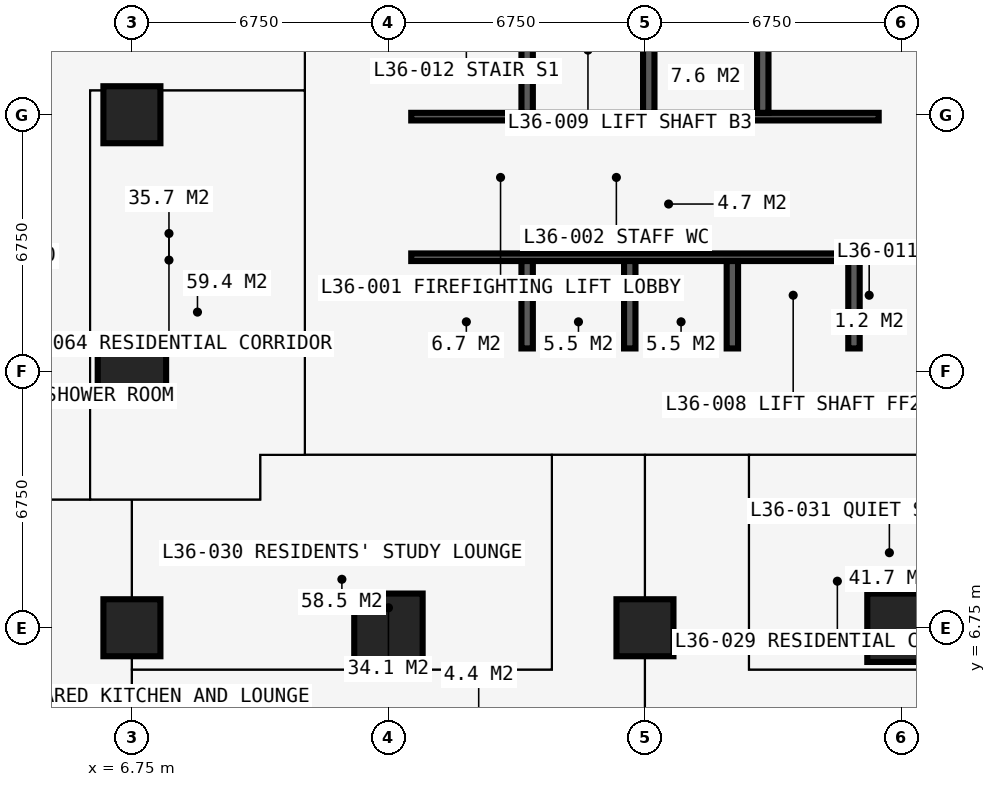
"""IFC4 building model, lengths in metres.
Left out: names, types, materials, properties, quantities, classifications, styles, units other than length and angle.
Written with IfcOpenShell. Run it as: python <this file> out.ifc"""

import sys

from ifc_helpers import new_model, si_unit, direction, frame, frame_2d, origin, origin_2d, place, context, subcontext, project, spatial, rectangle, extrude, element, fill, save


model = new_model("IFC4")
c1 = context("Model", 3, precision=1e-05, world=origin(), true_north=direction((0.0, 1.0)))
c2 = subcontext(c1, "Body", "Model", "MODEL_VIEW")
j1 = project(units=[si_unit("LENGTHUNIT", "METRE"), si_unit("PLANEANGLEUNIT", "RADIAN")], contexts=[c1])
p1 = place(None, origin())
s1 = spatial("IfcSite", under=j1, at=p1, CompositionType="ELEMENT")
p2 = place(p1, origin())
s2 = spatial("IfcBuilding", under=s1, at=p2, CompositionType="ELEMENT")
p3 = place(p2, frame((0.0, 0.0, 134.1)))
s3 = spatial("IfcBuildingStorey", under=s2, at=p3, CompositionType="ELEMENT", Elevation=134.1)
p4 = place(p3, frame((6.75, 6.75, 0.0), z_axis=(0.0, 0.0, 1.0), x_axis=(1.0, 0.0, 0.0)))
e1 = element("IfcColumn", 1, at=p4, inside=s3, PredefinedType="COLUMN", context=c2, shape_type="SweptSolid", body=[
    extrude(rectangle(XDim=1.5, YDim=1.5, at=origin_2d()), origin(), (0.0, 0.0, 1.0), 3.6),
])
p5 = place(p3, frame((6.75, 13.5, 0.0), z_axis=(0.0, 0.0, 1.0), x_axis=(1.0, 0.0, 0.0)))
e2 = element("IfcColumn", 2, at=p5, inside=s3, PredefinedType="COLUMN", context=c2, shape_type="SweptSolid", body=[
    extrude(rectangle(XDim=1.8, YDim=1.8, at=origin_2d()), origin(), (0.0, 0.0, 1.0), 3.6),
])
p6 = place(p3, frame((6.75, 20.25, 0.0), z_axis=(0.0, 0.0, 1.0), x_axis=(1.0, 0.0, 0.0)))
e3 = element("IfcColumn", 3, at=p6, inside=s3, PredefinedType="COLUMN", context=c2, shape_type="SweptSolid", body=[
    extrude(rectangle(XDim=1.5, YDim=1.5, at=origin_2d()), origin(), (0.0, 0.0, 1.0), 3.6),
])
p7 = place(p3, frame((13.5, 6.75, 0.0), z_axis=(0.0, 0.0, 1.0), x_axis=(1.0, 0.0, 0.0)))
e4 = element("IfcColumn", 4, at=p7, inside=s3, PredefinedType="COLUMN", context=c2, shape_type="SweptSolid", body=[
    extrude(rectangle(XDim=1.8, YDim=1.8, at=origin_2d()), origin(), (0.0, 0.0, 1.0), 3.6),
])
p8 = place(p3, frame((20.25, 6.75, 0.0), z_axis=(0.0, 0.0, 1.0), x_axis=(1.0, 0.0, 0.0)))
e5 = element("IfcColumn", 5, at=p8, inside=s3, PredefinedType="COLUMN", context=c2, shape_type="SweptSolid", body=[
    extrude(rectangle(XDim=1.5, YDim=1.5, at=origin_2d()), origin(), (0.0, 0.0, 1.0), 3.6),
])
p9 = place(p3, frame((27.0, 6.75, 0.0), z_axis=(0.0, 0.0, 1.0), x_axis=(1.0, 0.0, 0.0)))
e6 = element("IfcColumn", 6, at=p9, inside=s3, PredefinedType="COLUMN", context=c2, shape_type="SweptSolid", body=[
    extrude(rectangle(XDim=1.8, YDim=1.8, at=origin_2d()), origin(), (0.0, 0.0, 1.0), 3.6),
])
p10 = place(p3, frame((12.9, 13.5, 0.0), z_axis=(0.0, 0.0, 1.0), x_axis=(1.0, 0.0, 0.0)))
e7 = element("IfcWall", 7, at=p10, inside=s3, PredefinedType="SHEAR", context=c2, shape_type="SweptSolid", body=[
    extrude(rectangle(XDim=14.7, YDim=1.2, at=frame_2d((7.35, 0.0))), origin(), (0.0, 0.0, 1.0), 3.6),
])
p11 = place(p3, frame((27.0, 14.1, 0.0), z_axis=(0.0, 0.0, 1.0), x_axis=(0.0, 1.0, 0.0)))
e8 = element("IfcWall", 8, at=p11, inside=s3, PredefinedType="SHEAR", context=c2, shape_type="SweptSolid", body=[
    extrude(rectangle(XDim=12.3, YDim=1.2, at=frame_2d((6.15, 0.0))), origin(), (0.0, 0.0, 1.0), 3.6),
])
p12 = place(p11, frame((3.65, 0.0, 0.0)))
e9 = element("IfcOpeningElement", 9, at=p12, cuts=e8, PredefinedType="OPENING", context=c2, shape_type="SweptSolid", body=[
    extrude(rectangle(XDim=1.2, YDim=2.2, at=frame_2d((0.6, 1.1))), frame((0.0, 0.61, 0.0), z_axis=(0.0, -1.0, 0.0), x_axis=(1.0, 0.0, 0.0)), (0.0, 0.0, 1.0), 1.22),
])
p13 = place(p3, frame((13.5, 26.4, 0.0), z_axis=(0.0, 0.0, 1.0), x_axis=(0.0, -1.0, 0.0)))
e10 = element("IfcWall", 10, at=p13, inside=s3, PredefinedType="SHEAR", context=c2, shape_type="SweptSolid", body=[
    extrude(rectangle(XDim=12.3, YDim=1.2, at=frame_2d((6.15, 0.0))), origin(), (0.0, 0.0, 1.0), 3.6),
])
p14 = place(p13, frame((7.45, 0.0, 0.0)))
e11 = element("IfcOpeningElement", 11, at=p14, cuts=e10, PredefinedType="OPENING", context=c2, shape_type="SweptSolid", body=[
    extrude(rectangle(XDim=1.2, YDim=2.2, at=frame_2d((0.6, 1.1))), frame((0.0, 0.61, 0.0), z_axis=(0.0, -1.0, 0.0), x_axis=(1.0, 0.0, 0.0)), (0.0, 0.0, 1.0), 1.22),
])
p15 = place(p3, frame((14.1, 16.5, 0.0), z_axis=(0.0, 0.0, 1.0), x_axis=(1.0, 0.0, 0.0)))
e12 = element("IfcWall", 12, at=p15, inside=s3, PredefinedType="SHEAR", context=c2, shape_type="SweptSolid", body=[
    extrude(rectangle(XDim=12.3, YDim=0.2, at=frame_2d((6.15, 0.0))), origin(), (0.0, 0.0, 1.0), 3.6),
])
p16 = place(p15, frame((0.9, 0.0, 0.0)))
e13 = element("IfcOpeningElement", 13, at=p16, cuts=e12, PredefinedType="OPENING", context=c2, shape_type="SweptSolid", body=[
    extrude(rectangle(XDim=1.1, YDim=2.2, at=frame_2d((0.55, 1.1))), frame((0.0, 0.11, 0.0), z_axis=(0.0, -1.0, 0.0), x_axis=(1.0, 0.0, 0.0)), (0.0, 0.0, 1.0), 0.22),
])
p17 = place(p15, frame((9.5, 0.0, 0.0)))
e14 = element("IfcOpeningElement", 14, at=p17, cuts=e12, PredefinedType="OPENING", context=c2, shape_type="SweptSolid", body=[
    extrude(rectangle(XDim=1.1, YDim=2.2, at=frame_2d((0.55, 1.1))), frame((0.0, 0.11, 0.0), z_axis=(0.0, -1.0, 0.0), x_axis=(1.0, 0.0, 0.0)), (0.0, 0.0, 1.0), 0.22),
])
p18 = place(p3, frame((14.1, 20.2, 0.0), z_axis=(0.0, 0.0, 1.0), x_axis=(1.0, 0.0, 0.0)))
e15 = element("IfcWall", 15, at=p18, inside=s3, PredefinedType="SHEAR", context=c2, shape_type="SweptSolid", body=[
    extrude(rectangle(XDim=12.3, YDim=0.2, at=frame_2d((6.15, 0.0))), origin(), (0.0, 0.0, 1.0), 3.6),
])
p19 = place(p18, frame((0.35, 0.0, 0.0)))
e16 = element("IfcOpeningElement", 16, at=p19, cuts=e15, PredefinedType="OPENING", context=c2, shape_type="SweptSolid", body=[
    extrude(rectangle(XDim=1.1, YDim=2.2, at=frame_2d((0.55, 1.1))), frame((0.0, 0.11, 0.0), z_axis=(0.0, -1.0, 0.0), x_axis=(1.0, 0.0, 0.0)), (0.0, 0.0, 1.0), 0.22),
])
p20 = place(p18, frame((9.75, 0.0, 0.0)))
e17 = element("IfcOpeningElement", 17, at=p20, cuts=e15, PredefinedType="OPENING", context=c2, shape_type="SweptSolid", body=[
    extrude(rectangle(XDim=1.1, YDim=2.2, at=frame_2d((0.55, 1.1))), frame((0.0, 0.11, 0.0), z_axis=(0.0, -1.0, 0.0), x_axis=(1.0, 0.0, 0.0)), (0.0, 0.0, 1.0), 0.22),
])
for number, where, z_axis, x_axis in (
    (18, (17.15, 20.3, 0.0), (0.0, 0.0, 1.0), (0.0, 1.0, 0.0)),
    (19, (23.35, 20.3, 0.0), (0.0, 0.0, 1.0), (0.0, 1.0, 0.0)),
):
    element("IfcWall", number, at=place(p3, frame(where, z_axis=z_axis, x_axis=x_axis)), inside=s3, PredefinedType="SHEAR", context=c2, shape_type="SweptSolid", body=[
        extrude(rectangle(XDim=6.1, YDim=0.3, at=frame_2d((3.05, 0.0))), origin(), (0.0, 0.0, 1.0), 3.6),
    ])
p21 = place(p3, frame((20.35, 20.3, 0.0), z_axis=(0.0, 0.0, 1.0), x_axis=(0.0, 1.0, 0.0)))
e20 = element("IfcWall", 20, at=p21, inside=s3, PredefinedType="SHEAR", context=c2, shape_type="SweptSolid", body=[
    extrude(rectangle(XDim=2.8, YDim=0.3, at=frame_2d((1.4, 0.0))), origin(), (0.0, 0.0, 1.0), 3.6),
])
for number, where, z_axis, x_axis in (
    (21, (17.15, 14.1, 0.0), (0.0, 0.0, 1.0), (0.0, 1.0, 0.0)),
    (22, (19.85, 14.1, 0.0), (0.0, 0.0, 1.0), (0.0, 1.0, 0.0)),
    (23, (22.55, 14.1, 0.0), (0.0, 0.0, 1.0), (0.0, 1.0, 0.0)),
    (24, (25.75, 14.1, 0.0), (0.0, 0.0, 1.0), (0.0, 1.0, 0.0)),
):
    element("IfcWall", number, at=place(p3, frame(where, z_axis=z_axis, x_axis=x_axis)), inside=s3, PredefinedType="SHEAR", context=c2, shape_type="SweptSolid", body=[
        extrude(rectangle(XDim=2.3, YDim=0.3, at=frame_2d((1.15, 0.0))), origin(), (0.0, 0.0, 1.0), 3.6),
    ])
p22 = place(p3, frame((18.875, 16.6, 0.0), z_axis=(0.0, 0.0, 1.0), x_axis=(0.0, 1.0, 0.0)))
e25 = element("IfcWall", 25, at=p22, inside=s3, PredefinedType="PARTITIONING", context=c2, shape_type="SweptSolid", body=[
    extrude(rectangle(XDim=3.5, YDim=0.15, at=frame_2d((1.75, 0.0))), origin(), (0.0, 0.0, 1.0), 3.3),
])
p23 = place(p22, frame((1.15, 0.0, 0.0)))
e26 = element("IfcOpeningElement", 26, at=p23, cuts=e25, PredefinedType="OPENING", context=c2, shape_type="SweptSolid", body=[
    extrude(rectangle(XDim=1.2, YDim=2.2, at=frame_2d((0.6, 1.1))), frame((0.0, 0.085, 0.0), z_axis=(0.0, -1.0, 0.0), x_axis=(1.0, 0.0, 0.0)), (0.0, 0.0, 1.0), 0.17),
])
p24 = place(p3, frame((21.625, 16.6, 0.0), z_axis=(0.0, 0.0, 1.0), x_axis=(0.0, 1.0, 0.0)))
e27 = element("IfcWall", 27, at=p24, inside=s3, PredefinedType="PARTITIONING", context=c2, shape_type="SweptSolid", body=[
    extrude(rectangle(XDim=3.5, YDim=0.15, at=frame_2d((1.75, 0.0))), origin(), (0.0, 0.0, 1.0), 3.3),
])
p25 = place(p24, frame((1.15, 0.0, 0.0)))
e28 = element("IfcOpeningElement", 28, at=p25, cuts=e27, PredefinedType="OPENING", context=c2, shape_type="SweptSolid", body=[
    extrude(rectangle(XDim=1.2, YDim=2.2, at=frame_2d((0.6, 1.1))), frame((0.0, 0.085, 0.0), z_axis=(0.0, -1.0, 0.0), x_axis=(1.0, 0.0, 0.0)), (0.0, 0.0, 1.0), 0.17),
])
p26 = place(p3, frame((20.12, 16.6, 0.0), z_axis=(0.0, 0.0, 1.0), x_axis=(0.0, 1.0, 0.0)))
e29 = element("IfcWall", 29, at=p26, inside=s3, PredefinedType="PARTITIONING", context=c2, shape_type="SweptSolid", body=[
    extrude(rectangle(XDim=3.5, YDim=0.15, at=frame_2d((1.75, 0.0))), origin(), (0.0, 0.0, 1.0), 3.3),
])
p27 = place(p3, frame((-0.734, 10.125, 0.0), z_axis=(0.0, 0.0, 1.0), x_axis=(1.0, 0.0, 0.0)))
e30 = element("IfcWall", 30, at=p27, inside=s3, PredefinedType="PARTITIONING", context=c2, shape_type="SweptSolid", body=[
    extrude(rectangle(XDim=10.859, YDim=0.15, at=frame_2d((5.429, 0.0))), origin(), (0.0, 0.0, 1.0), 3.3),
])
p28 = place(p3, frame((5.65, 10.125, 0.0), z_axis=(0.0, 0.0, 1.0), x_axis=(0.0, 1.0, 0.0)))
e31 = element("IfcWall", 31, at=p28, inside=s3, PredefinedType="PARTITIONING", context=c2, shape_type="SweptSolid", body=[
    extrude(rectangle(XDim=10.762, YDim=0.15, at=frame_2d((5.381, 0.0))), origin(), (0.0, 0.0, 1.0), 3.3),
])
p29 = place(p28, frame((4.9, 0.0, 0.0)))
e32 = element("IfcOpeningElement", 32, at=p29, cuts=e31, PredefinedType="OPENING", context=c2, shape_type="SweptSolid", body=[
    extrude(rectangle(XDim=0.95, YDim=2.2, at=frame_2d((0.475, 1.1))), frame((0.0, 0.085, 0.0), z_axis=(0.0, -1.0, 0.0), x_axis=(1.0, 0.0, 0.0)), (0.0, 0.0, 1.0), 0.17),
])
p30 = place(p3, frame((5.65, 20.887, 0.0), z_axis=(0.0, 0.0, 1.0), x_axis=(1.0, 0.0, 0.0)))
e33 = element("IfcWall", 33, at=p30, inside=s3, PredefinedType="PARTITIONING", context=c2, shape_type="SweptSolid", body=[
    extrude(rectangle(XDim=5.65, YDim=0.15, at=frame_2d((2.825, 0.0))), origin(), (0.0, 0.0, 1.0), 3.3),
])
p31 = place(p3, frame((6.75, 4.15, 0.0), z_axis=(0.0, 0.0, 1.0), x_axis=(0.0, 1.0, 0.0)))
e34 = element("IfcWall", 34, at=p31, inside=s3, PredefinedType="PARTITIONING", context=c2, shape_type="SweptSolid", body=[
    extrude(rectangle(XDim=5.975, YDim=0.15, at=frame_2d((2.988, 0.0))), origin(), (0.0, 0.0, 1.0), 2.802),
])
p32 = place(p3, frame((6.75, 5.65, 0.0), z_axis=(0.0, 0.0, 1.0), x_axis=(1.0, 0.0, 0.0)))
e35 = element("IfcWall", 35, at=p32, inside=s3, PredefinedType="PARTITIONING", context=c2, shape_type="SweptSolid", body=[
    extrude(rectangle(XDim=11.05, YDim=0.15, at=frame_2d((5.525, 0.0))), origin(), (0.0, 0.0, 1.0), 3.3),
])
p33 = place(p3, frame((10.125, 10.125, 0.0), z_axis=(0.0, 0.0, 1.0), x_axis=(0.0, 1.0, 0.0)))
e36 = element("IfcWall", 36, at=p33, inside=s3, PredefinedType="PARTITIONING", context=c2, shape_type="SweptSolid", body=[
    extrude(rectangle(XDim=1.175, YDim=0.15, at=frame_2d((0.587, 0.0))), origin(), (0.0, 0.0, 1.0), 3.3),
])
p34 = place(p3, frame((10.125, 11.3, 0.0), z_axis=(0.0, 0.0, 1.0), x_axis=(1.0, 0.0, 0.0)))
e37 = element("IfcWall", 37, at=p34, inside=s3, PredefinedType="PARTITIONING", context=c2, shape_type="SweptSolid", body=[
    extrude(rectangle(XDim=20.675, YDim=0.15, at=frame_2d((10.337, 0.0))), origin(), (0.0, 0.0, 1.0), 3.3),
])
p35 = place(p34, frame((8.375, 0.0, 0.0)))
e38 = element("IfcOpeningElement", 38, at=p35, cuts=e37, PredefinedType="OPENING", context=c2, shape_type="SweptSolid", body=[
    extrude(rectangle(XDim=1.0, YDim=2.2, at=frame_2d((0.5, 1.1))), frame((0.0, 0.085, 0.0), z_axis=(0.0, -1.0, 0.0), x_axis=(1.0, 0.0, 0.0)), (0.0, 0.0, 1.0), 0.17),
])
p36 = place(p34, frame((10.975, 0.0, 0.0)))
e39 = element("IfcOpeningElement", 39, at=p36, cuts=e37, PredefinedType="OPENING", context=c2, shape_type="SweptSolid", body=[
    extrude(rectangle(XDim=1.0, YDim=2.2, at=frame_2d((0.5, 1.1))), frame((0.0, 0.085, 0.0), z_axis=(0.0, -1.0, 0.0), x_axis=(1.0, 0.0, 0.0)), (0.0, 0.0, 1.0), 0.17),
])
p37 = place(p34, frame((3.925, 0.0, 0.0)))
e40 = element("IfcOpeningElement", 40, at=p37, cuts=e37, PredefinedType="OPENING", context=c2, shape_type="SweptSolid", body=[
    extrude(rectangle(XDim=0.95, YDim=2.2, at=frame_2d((0.475, 1.1))), frame((0.0, 0.085, 0.0), z_axis=(0.0, -1.0, 0.0), x_axis=(1.0, 0.0, 0.0)), (0.0, 0.0, 1.0), 0.17),
])
p38 = place(p3, frame((11.3, 11.3, 0.0), z_axis=(0.0, 0.0, 1.0), x_axis=(0.0, 1.0, 0.0)))
e41 = element("IfcWall", 41, at=p38, inside=s3, PredefinedType="PARTITIONING", context=c2, shape_type="SweptSolid", body=[
    extrude(rectangle(XDim=19.3, YDim=0.15, at=frame_2d((9.65, 0.0))), origin(), (0.0, 0.0, 1.0), 3.3),
])
p39 = place(p38, frame((13.525, 0.0, 0.0)))
e42 = element("IfcOpeningElement", 42, at=p39, cuts=e41, PredefinedType="OPENING", context=c2, shape_type="SweptSolid", body=[
    extrude(rectangle(XDim=1.0, YDim=2.2, at=frame_2d((0.5, 1.1))), frame((0.0, 0.085, 0.0), z_axis=(0.0, -1.0, 0.0), x_axis=(1.0, 0.0, 0.0)), (0.0, 0.0, 1.0), 0.17),
])
p40 = place(p38, frame((10.438, 0.0, 0.0)))
e43 = element("IfcOpeningElement", 43, at=p40, cuts=e41, PredefinedType="OPENING", context=c2, shape_type="SweptSolid", body=[
    extrude(rectangle(XDim=1.0, YDim=2.2, at=frame_2d((0.5, 1.1))), frame((0.0, 0.085, 0.0), z_axis=(0.0, -1.0, 0.0), x_axis=(1.0, 0.0, 0.0)), (0.0, 0.0, 1.0), 0.17),
])
p41 = place(p3, frame((17.8, 5.65, 0.0), z_axis=(0.0, 0.0, 1.0), x_axis=(0.0, 1.0, 0.0)))
e44 = element("IfcWall", 44, at=p41, inside=s3, PredefinedType="PARTITIONING", context=c2, shape_type="SweptSolid", body=[
    extrude(rectangle(XDim=5.65, YDim=0.15, at=frame_2d((2.825, 0.0))), origin(), (0.0, 0.0, 1.0), 3.3),
])
p42 = place(p3, frame((20.25, -0.734, 0.0), z_axis=(0.0, 0.0, 1.0), x_axis=(0.0, 1.0, 0.0)))
e45 = element("IfcWall", 45, at=p42, inside=s3, PredefinedType="PARTITIONING", context=c2, shape_type="SweptSolid", body=[
    extrude(rectangle(XDim=12.034, YDim=0.15, at=frame_2d((6.017, 0.0))), origin(), (0.0, 0.0, 1.0), 2.802),
])
p43 = place(p3, frame((22.988, 5.65, 0.0), z_axis=(0.0, 0.0, 1.0), x_axis=(1.0, 0.0, 0.0)))
e46 = element("IfcWall", 46, at=p43, inside=s3, PredefinedType="PARTITIONING", context=c2, shape_type="SweptSolid", body=[
    extrude(rectangle(XDim=7.387, YDim=0.15, at=frame_2d((3.694, 0.0))), origin(), (0.0, 0.0, 1.0), 3.3),
])
p44 = place(p43, frame((2.15, 0.0, 0.0)))
e47 = element("IfcOpeningElement", 47, at=p44, cuts=e46, PredefinedType="OPENING", context=c2, shape_type="SweptSolid", body=[
    extrude(rectangle(XDim=0.95, YDim=2.2, at=frame_2d((0.475, 1.1))), frame((0.0, 0.085, 0.0), z_axis=(0.0, -1.0, 0.0), x_axis=(1.0, 0.0, 0.0)), (0.0, 0.0, 1.0), 0.17),
])
p45 = place(p3, frame((22.988, 5.65, 0.0), z_axis=(0.0, 0.0, 1.0), x_axis=(0.0, 1.0, 0.0)))
e48 = element("IfcWall", 48, at=p45, inside=s3, PredefinedType="PARTITIONING", context=c2, shape_type="SweptSolid", body=[
    extrude(rectangle(XDim=5.65, YDim=0.15, at=frame_2d((2.825, 0.0))), origin(), (0.0, 0.0, 1.0), 3.3),
])
p46 = place(p16, origin())
e49 = element("IfcDoor", 49, at=p46, inside=s3, OperationType="DOUBLE_DOOR_SLIDING", PredefinedType="DOOR", context=c2, shape_type="SweptSolid", body=[
    extrude(rectangle(XDim=1.1, YDim=2.2, at=frame_2d((0.55, 1.1))), frame((0.0, 0.025, 0.0), z_axis=(0.0, -1.0, 0.0), x_axis=(1.0, 0.0, 0.0)), (0.0, 0.0, 1.0), 0.05),
])
fill(e13, e49)
p47 = place(p17, origin())
e50 = element("IfcDoor", 50, at=p47, inside=s3, OperationType="DOUBLE_DOOR_SLIDING", PredefinedType="DOOR", context=c2, shape_type="SweptSolid", body=[
    extrude(rectangle(XDim=1.1, YDim=2.2, at=frame_2d((0.55, 1.1))), frame((0.0, 0.025, 0.0), z_axis=(0.0, -1.0, 0.0), x_axis=(1.0, 0.0, 0.0)), (0.0, 0.0, 1.0), 0.05),
])
fill(e14, e50)
p48 = place(p14, origin())
e51 = element("IfcDoor", 51, at=p48, inside=s3, OperationType="DOUBLE_DOOR_SINGLE_SWING", PredefinedType="DOOR", context=c2, shape_type="SweptSolid", body=[
    extrude(rectangle(XDim=1.2, YDim=2.2, at=frame_2d((0.6, 1.1))), frame((0.0, 0.025, 0.0), z_axis=(0.0, -1.0, 0.0), x_axis=(1.0, 0.0, 0.0)), (0.0, 0.0, 1.0), 0.05),
])
fill(e11, e51)
p49 = place(p12, origin())
e52 = element("IfcDoor", 52, at=p49, inside=s3, OperationType="DOUBLE_DOOR_SINGLE_SWING", PredefinedType="DOOR", context=c2, shape_type="SweptSolid", body=[
    extrude(rectangle(XDim=1.2, YDim=2.2, at=frame_2d((0.6, 1.1))), frame((0.0, 0.025, 0.0), z_axis=(0.0, -1.0, 0.0), x_axis=(1.0, 0.0, 0.0)), (0.0, 0.0, 1.0), 0.05),
])
fill(e9, e52)
p50 = place(p23, origin())
e53 = element("IfcDoor", 53, at=p50, inside=s3, OperationType="DOUBLE_DOOR_SINGLE_SWING", PredefinedType="DOOR", context=c2, shape_type="SweptSolid", body=[
    extrude(rectangle(XDim=1.2, YDim=2.2, at=frame_2d((0.6, 1.1))), frame((0.0, 0.025, 0.0), z_axis=(0.0, -1.0, 0.0), x_axis=(1.0, 0.0, 0.0)), (0.0, 0.0, 1.0), 0.05),
])
fill(e26, e53)
p51 = place(p25, origin())
e54 = element("IfcDoor", 54, at=p51, inside=s3, OperationType="DOUBLE_DOOR_SINGLE_SWING", PredefinedType="DOOR", context=c2, shape_type="SweptSolid", body=[
    extrude(rectangle(XDim=1.2, YDim=2.2, at=frame_2d((0.6, 1.1))), frame((0.0, 0.025, 0.0), z_axis=(0.0, -1.0, 0.0), x_axis=(1.0, 0.0, 0.0)), (0.0, 0.0, 1.0), 0.05),
])
fill(e28, e54)
p52 = place(p19, origin())
e55 = element("IfcDoor", 55, at=p52, inside=s3, OperationType="SINGLE_SWING_LEFT", PredefinedType="DOOR", context=c2, shape_type="SweptSolid", body=[
    extrude(rectangle(XDim=1.1, YDim=2.2, at=frame_2d((0.55, 1.1))), frame((0.0, 0.025, 0.0), z_axis=(0.0, -1.0, 0.0), x_axis=(1.0, 0.0, 0.0)), (0.0, 0.0, 1.0), 0.05),
])
fill(e16, e55)
p53 = place(p20, origin())
e56 = element("IfcDoor", 56, at=p53, inside=s3, OperationType="SINGLE_SWING_LEFT", PredefinedType="DOOR", context=c2, shape_type="SweptSolid", body=[
    extrude(rectangle(XDim=1.1, YDim=2.2, at=frame_2d((0.55, 1.1))), frame((0.0, 0.025, 0.0), z_axis=(0.0, -1.0, 0.0), x_axis=(1.0, 0.0, 0.0)), (0.0, 0.0, 1.0), 0.05),
])
fill(e17, e56)
p54 = place(p35, origin())
e57 = element("IfcDoor", 57, at=p54, inside=s3, OperationType="SINGLE_SWING_LEFT", PredefinedType="DOOR", context=c2, shape_type="SweptSolid", body=[
    extrude(rectangle(XDim=1.0, YDim=2.2, at=frame_2d((0.5, 1.1))), frame((0.0, 0.025, 0.0), z_axis=(0.0, -1.0, 0.0), x_axis=(1.0, 0.0, 0.0)), (0.0, 0.0, 1.0), 0.05),
])
fill(e38, e57)
p55 = place(p36, origin())
e58 = element("IfcDoor", 58, at=p55, inside=s3, OperationType="SINGLE_SWING_LEFT", PredefinedType="DOOR", context=c2, shape_type="SweptSolid", body=[
    extrude(rectangle(XDim=1.0, YDim=2.2, at=frame_2d((0.5, 1.1))), frame((0.0, 0.025, 0.0), z_axis=(0.0, -1.0, 0.0), x_axis=(1.0, 0.0, 0.0)), (0.0, 0.0, 1.0), 0.05),
])
fill(e39, e58)
p56 = place(p37, origin())
e59 = element("IfcDoor", 59, at=p56, inside=s3, OperationType="SINGLE_SWING_LEFT", PredefinedType="DOOR", context=c2, shape_type="SweptSolid", body=[
    extrude(rectangle(XDim=0.95, YDim=2.2, at=frame_2d((0.475, 1.1))), frame((0.0, 0.025, 0.0), z_axis=(0.0, -1.0, 0.0), x_axis=(1.0, 0.0, 0.0)), (0.0, 0.0, 1.0), 0.05),
])
fill(e40, e59)
p57 = place(p44, origin())
e60 = element("IfcDoor", 60, at=p57, inside=s3, OperationType="SINGLE_SWING_LEFT", PredefinedType="DOOR", context=c2, shape_type="SweptSolid", body=[
    extrude(rectangle(XDim=0.95, YDim=2.2, at=frame_2d((0.475, 1.1))), frame((0.0, 0.025, 0.0), z_axis=(0.0, -1.0, 0.0), x_axis=(1.0, 0.0, 0.0)), (0.0, 0.0, 1.0), 0.05),
])
fill(e47, e60)
p58 = place(p40, origin())
e61 = element("IfcDoor", 61, at=p58, inside=s3, OperationType="SINGLE_SWING_LEFT", PredefinedType="DOOR", context=c2, shape_type="SweptSolid", body=[
    extrude(rectangle(XDim=1.0, YDim=2.2, at=frame_2d((0.5, 1.1))), frame((0.0, 0.025, 0.0), z_axis=(0.0, -1.0, 0.0), x_axis=(1.0, 0.0, 0.0)), (0.0, 0.0, 1.0), 0.05),
])
fill(e43, e61)
p59 = place(p29, origin())
e62 = element("IfcDoor", 62, at=p59, inside=s3, OperationType="SINGLE_SWING_LEFT", PredefinedType="DOOR", context=c2, shape_type="SweptSolid", body=[
    extrude(rectangle(XDim=0.95, YDim=2.2, at=frame_2d((0.475, 1.1))), frame((0.0, 0.025, 0.0), z_axis=(0.0, -1.0, 0.0), x_axis=(1.0, 0.0, 0.0)), (0.0, 0.0, 1.0), 0.05),
])
fill(e32, e62)
save(model, sys.argv[1])
